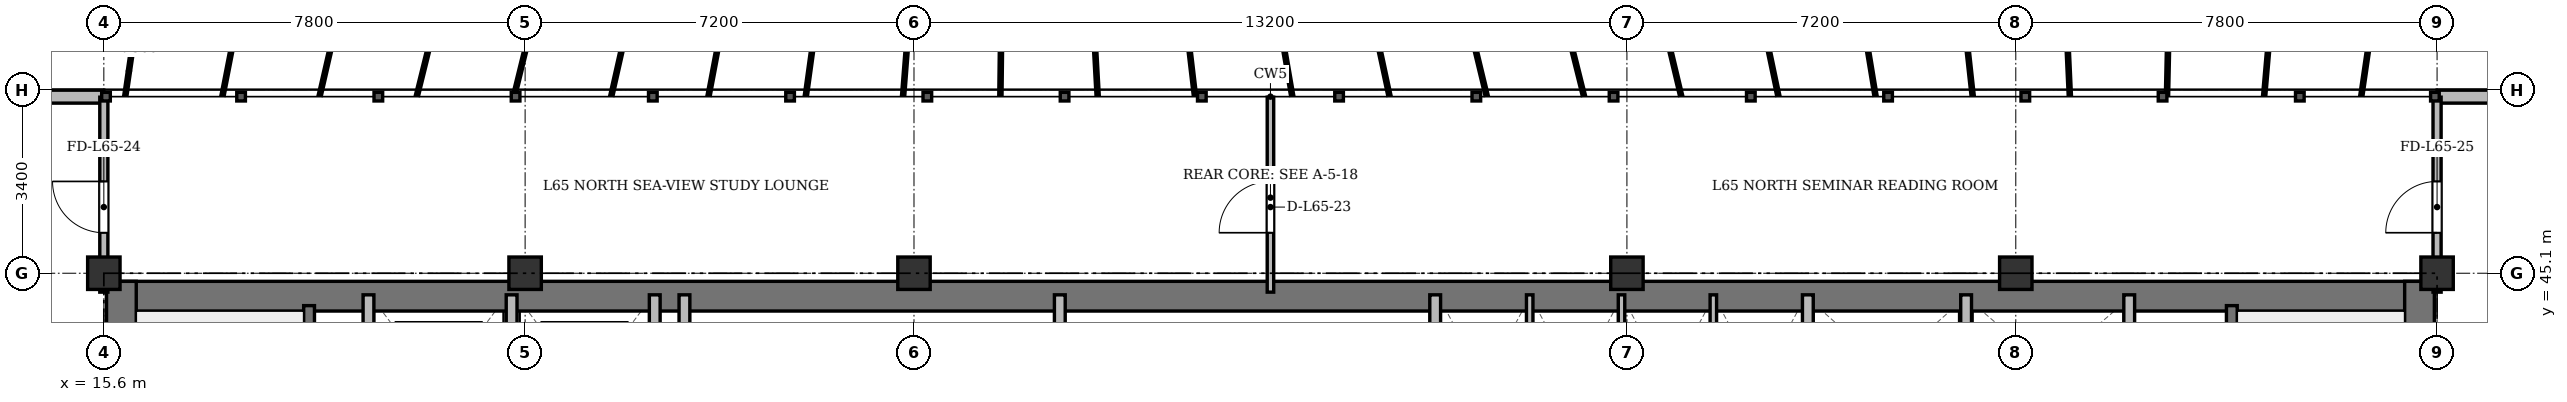
"""IFC4 building model, lengths in metres.
Left out: names, types, materials, properties, quantities, classifications, styles, units other than length and angle.
Written with IfcOpenShell. Run it as: python <this file> out.ifc"""

import sys

from ifc_helpers import new_model, si_unit, direction, frame, frame_2d, origin, origin_2d, place, context, subcontext, project, spatial, rectangle, extrude, source, transform, mapped, element, fill, save


model = new_model("IFC4")
c1 = context("Model", 3, precision=1e-05, world=origin(), true_north=direction((0.0, 1.0)))
c2 = subcontext(c1, "Body", "Model", "MODEL_VIEW")
j1 = project(units=[si_unit("LENGTHUNIT", "METRE"), si_unit("PLANEANGLEUNIT", "RADIAN")], contexts=[c1])
p1 = place(None, origin())
s1 = spatial("IfcSite", under=j1, at=p1, CompositionType="ELEMENT")
p2 = place(p1, origin())
s2 = spatial("IfcBuilding", under=s1, at=p2, CompositionType="ELEMENT")
p3 = place(p2, frame((0.0, 0.0, 252.3)))
s3 = spatial("IfcBuildingStorey", under=s2, at=p3, CompositionType="ELEMENT", Elevation=252.3)
m1 = source(origin(), c2, "Body", "SweptSolid", [
    extrude(rectangle(XDim=0.6, YDim=0.6, at=origin_2d()), origin(), (0.0, 0.0, 1.0), 3.6),
])
for number, where, z_axis, x_axis in (
    (1, (15.6, 45.1, 0.0), (0.0, 0.0, 1.0), (1.0, 0.0, 0.0)),
    (2, (23.4, 45.1, 0.0), (0.0, 0.0, 1.0), (1.0, 0.0, 0.0)),
    (3, (30.6, 45.1, 0.0), (0.0, 0.0, 1.0), (1.0, 0.0, 0.0)),
    (4, (43.8, 45.1, 0.0), (0.0, 0.0, 1.0), (1.0, 0.0, 0.0)),
    (5, (51.0, 45.1, 0.0), (0.0, 0.0, 1.0), (1.0, 0.0, 0.0)),
    (6, (58.8, 45.1, 0.0), (0.0, 0.0, 1.0), (1.0, 0.0, 0.0)),
):
    element("IfcColumn", number, at=place(p3, frame(where, z_axis=z_axis, x_axis=x_axis)), inside=s3, PredefinedType="COLUMN", context=c2, shape_type="MappedRepresentation", body=[
        mapped(m1, transform((0.0, 0.0, 0.0), x_axis=(1.0, 0.0, 0.0), y_axis=(0.0, 1.0, 0.0), z_axis=(0.0, 0.0, 1.0), scale=1.0)),
    ])
p4 = place(p3, frame((11.3, 48.37, 0.0), z_axis=(0.0, 0.0, 1.0), x_axis=(1.0, 0.0, 0.0)))
e7 = element("IfcWall", 7, at=p4, inside=s3, PredefinedType="SOLIDWALL", context=c2, shape_type="SweptSolid", body=[
    extrude(rectangle(XDim=4.3, YDim=0.24, at=frame_2d((2.15, 0.0))), origin(), (0.0, 0.0, 1.0), 3.37),
])
p5 = place(p4, frame((1.475, 0.0, 0.9)))
e8 = element("IfcOpeningElement", 8, at=p5, cuts=e7, PredefinedType="OPENING", context=c2, shape_type="SweptSolid", body=[
    extrude(rectangle(XDim=1.35, YDim=1.5, at=frame_2d((0.675, 0.75))), frame((0.0, 0.13, 0.0), z_axis=(0.0, -1.0, 0.0), x_axis=(1.0, 0.0, 0.0)), (0.0, 0.0, 1.0), 0.26),
])
p6 = place(p3, frame((58.8, 48.37, 0.0), z_axis=(0.0, 0.0, 1.0), x_axis=(1.0, 0.0, 0.0)))
e9 = element("IfcWall", 9, at=p6, inside=s3, PredefinedType="SOLIDWALL", context=c2, shape_type="SweptSolid", body=[
    extrude(rectangle(XDim=4.3, YDim=0.24, at=frame_2d((2.15, 0.0))), origin(), (0.0, 0.0, 1.0), 3.37),
])
p7 = place(p6, frame((1.475, 0.0, 0.9)))
e10 = element("IfcOpeningElement", 10, at=p7, cuts=e9, PredefinedType="OPENING", context=c2, shape_type="SweptSolid", body=[
    extrude(rectangle(XDim=1.35, YDim=1.5, at=frame_2d((0.675, 0.75))), frame((0.0, 0.13, 0.0), z_axis=(0.0, -1.0, 0.0), x_axis=(1.0, 0.0, 0.0)), (0.0, 0.0, 1.0), 0.26),
])
p8 = place(p3, frame((15.65, 44.675, 0.0), z_axis=(0.0, 0.0, 1.0), x_axis=(1.0, 0.0, 0.0)))
e11 = element("IfcWall", 11, at=p8, inside=s3, PredefinedType="SHEAR", context=c2, shape_type="SweptSolid", body=[
    extrude(rectangle(XDim=43.1, YDim=0.55, at=frame_2d((21.55, 0.0))), origin(), (0.0, 0.0, 1.0), 3.37),
])
for number, where, z_axis, x_axis in (
    (12, (15.925, 33.4, 0.0), (0.0, 0.0, 1.0), (0.0, 1.0, 0.0)),
    (13, (58.475, 33.4, 0.0), (0.0, 0.0, 1.0), (0.0, 1.0, 0.0)),
):
    element("IfcWall", number, at=place(p3, frame(where, z_axis=z_axis, x_axis=x_axis)), inside=s3, PredefinedType="SHEAR", context=c2, shape_type="SweptSolid", body=[
        extrude(rectangle(XDim=11.55, YDim=0.55, at=frame_2d((5.775, 0.0))), origin(), (0.0, 0.0, 1.0), 3.37),
    ])
p9 = place(p3, frame((19.4, 33.4, 0.0), z_axis=(0.0, 0.0, 1.0), x_axis=(0.0, 1.0, 0.0)))
e14 = element("IfcWall", 14, at=p9, inside=s3, PredefinedType="SHEAR", context=c2, shape_type="SweptSolid", body=[
    extrude(rectangle(XDim=11.1, YDim=0.2, at=frame_2d((5.55, 0.0))), origin(), (0.0, 0.0, 1.0), 3.37),
])
p10 = place(p9, frame((0.85, 0.0, 0.0)))
e15 = element("IfcOpeningElement", 15, at=p10, cuts=e14, PredefinedType="OPENING", context=c2, shape_type="SweptSolid", body=[
    extrude(rectangle(XDim=1.1, YDim=2.15, at=frame_2d((0.55, 1.075))), frame((0.0, 0.11, 0.0), z_axis=(0.0, -1.0, 0.0), x_axis=(1.0, 0.0, 0.0)), (0.0, 0.0, 1.0), 0.22),
])
p11 = place(p3, frame((55.0, 33.4, 0.0), z_axis=(0.0, 0.0, 1.0), x_axis=(0.0, 1.0, 0.0)))
e16 = element("IfcWall", 16, at=p11, inside=s3, PredefinedType="SHEAR", context=c2, shape_type="SweptSolid", body=[
    extrude(rectangle(XDim=11.1, YDim=0.2, at=frame_2d((5.55, 0.0))), origin(), (0.0, 0.0, 1.0), 3.37),
])
p12 = place(p11, frame((0.85, 0.0, 0.0)))
e17 = element("IfcOpeningElement", 17, at=p12, cuts=e16, PredefinedType="OPENING", context=c2, shape_type="SweptSolid", body=[
    extrude(rectangle(XDim=1.1, YDim=2.15, at=frame_2d((0.55, 1.075))), frame((0.0, 0.11, 0.0), z_axis=(0.0, -1.0, 0.0), x_axis=(1.0, 0.0, 0.0)), (0.0, 0.0, 1.0), 0.22),
])
for number, where, z_axis, x_axis in (
    (18, (20.5, 41.3, 0.0), (0.0, 0.0, 1.0), (0.0, 1.0, 0.0)),
    (19, (23.15, 41.3, 0.0), (0.0, 0.0, 1.0), (0.0, 1.0, 0.0)),
    (20, (25.8, 41.3, 0.0), (0.0, 0.0, 1.0), (0.0, 1.0, 0.0)),
):
    element("IfcWall", number, at=place(p3, frame(where, z_axis=z_axis, x_axis=x_axis)), inside=s3, PredefinedType="SOLIDWALL", context=c2, shape_type="SweptSolid", body=[
        extrude(rectangle(XDim=3.4, YDim=0.2, at=frame_2d((1.7, 0.0))), origin(), (0.0, 0.0, 1.0), 3.37),
    ])
for number, where, z_axis, x_axis in (
    (21, (26.35, 33.4, 0.0), (0.0, 0.0, 1.0), (0.0, 1.0, 0.0)),
    (22, (33.3, 33.4, 0.0), (0.0, 0.0, 1.0), (0.0, 1.0, 0.0)),
):
    element("IfcWall", number, at=place(p3, frame(where, z_axis=z_axis, x_axis=x_axis)), inside=s3, PredefinedType="SOLIDWALL", context=c2, shape_type="SweptSolid", body=[
        extrude(rectangle(XDim=11.3, YDim=0.2, at=frame_2d((5.65, 0.0))), origin(), (0.0, 0.0, 1.0), 2.92),
    ])
p13 = place(p3, frame((40.25, 41.5, 0.0), z_axis=(0.0, 0.0, 1.0), x_axis=(0.0, 1.0, 0.0)))
e23 = element("IfcWall", 23, at=p13, inside=s3, PredefinedType="SOLIDWALL", context=c2, shape_type="SweptSolid", body=[
    extrude(rectangle(XDim=3.2, YDim=0.2, at=frame_2d((1.6, 0.0))), origin(), (0.0, 0.0, 1.0), 3.37),
])
for number, where, z_axis, x_axis in (
    (24, (42.0, 41.5, 0.0), (0.0, 0.0, 1.0), (0.0, 1.0, 0.0)),
    (25, (43.7, 41.5, 0.0), (0.0, 0.0, 1.0), (0.0, 1.0, 0.0)),
    (26, (45.4, 41.5, 0.0), (0.0, 0.0, 1.0), (0.0, 1.0, 0.0)),
):
    element("IfcWall", number, at=place(p3, frame(where, z_axis=z_axis, x_axis=x_axis)), inside=s3, PredefinedType="PARTITIONING", context=c2, shape_type="SweptSolid", body=[
        extrude(rectangle(XDim=3.2, YDim=0.12, at=frame_2d((1.6, 0.0))), origin(), (0.0, 0.0, 1.0), 3.37),
    ])
p14 = place(p3, frame((47.15, 33.4, 0.0), z_axis=(0.0, 0.0, 1.0), x_axis=(0.0, 1.0, 0.0)))
e27 = element("IfcWall", 27, at=p14, inside=s3, PredefinedType="SOLIDWALL", context=c2, shape_type="SweptSolid", body=[
    extrude(rectangle(XDim=11.3, YDim=0.2, at=frame_2d((5.65, 0.0))), origin(), (0.0, 0.0, 1.0), 2.92),
])
for number, where, z_axis, x_axis in (
    (28, (50.08, 42.05, 0.0), (0.0, 0.0, 1.0), (0.0, 1.0, 0.0)),
    (29, (53.1, 42.05, 0.0), (0.0, 0.0, 1.0), (0.0, 1.0, 0.0)),
):
    element("IfcWall", number, at=place(p3, frame(where, z_axis=z_axis, x_axis=x_axis)), inside=s3, PredefinedType="SOLIDWALL", context=c2, shape_type="SweptSolid", body=[
        extrude(rectangle(XDim=2.65, YDim=0.2, at=frame_2d((1.325, 0.0))), origin(), (0.0, 0.0, 1.0), 3.37),
    ])
p15 = place(p3, frame((37.2, 44.75, 0.0), z_axis=(0.0, 0.0, 1.0), x_axis=(0.0, 1.0, 0.0)))
e30 = element("IfcWall", 30, at=p15, inside=s3, PredefinedType="PARTITIONING", context=c2, shape_type="SweptSolid", body=[
    extrude(rectangle(XDim=3.61, YDim=0.12, at=frame_2d((1.805, 0.0))), origin(), (0.0, 0.0, 1.0), 2.92),
])
p16 = place(p15, frame((1.1, 0.0, 0.0)))
e31 = element("IfcOpeningElement", 31, at=p16, cuts=e30, PredefinedType="OPENING", context=c2, shape_type="SweptSolid", body=[
    extrude(rectangle(XDim=0.95, YDim=2.15, at=frame_2d((0.475, 1.075))), frame((0.0, 0.07, 0.0), z_axis=(0.0, -1.0, 0.0), x_axis=(1.0, 0.0, 0.0)), (0.0, 0.0, 1.0), 0.14),
])
p17 = place(p3, frame((15.6, 44.75, 0.0), z_axis=(0.0, 0.0, 1.0), x_axis=(0.0, 1.0, 0.0)))
e32 = element("IfcWall", 32, at=p17, inside=s3, PredefinedType="PARTITIONING", context=c2, shape_type="SweptSolid", body=[
    extrude(rectangle(XDim=3.61, YDim=0.15, at=frame_2d((1.805, 0.0))), origin(), (0.0, 0.0, 1.0), 2.87),
])
p18 = place(p17, frame((1.1, 0.0, 0.0)))
e33 = element("IfcOpeningElement", 33, at=p18, cuts=e32, PredefinedType="OPENING", context=c2, shape_type="SweptSolid", body=[
    extrude(rectangle(XDim=0.95, YDim=2.15, at=frame_2d((0.475, 1.075))), frame((0.0, 0.085, 0.0), z_axis=(0.0, -1.0, 0.0), x_axis=(1.0, 0.0, 0.0)), (0.0, 0.0, 1.0), 0.17),
])
p19 = place(p3, frame((58.8, 44.75, 0.0), z_axis=(0.0, 0.0, 1.0), x_axis=(0.0, 1.0, 0.0)))
e34 = element("IfcWall", 34, at=p19, inside=s3, PredefinedType="PARTITIONING", context=c2, shape_type="SweptSolid", body=[
    extrude(rectangle(XDim=3.61, YDim=0.15, at=frame_2d((1.805, 0.0))), origin(), (0.0, 0.0, 1.0), 2.87),
])
p20 = place(p19, frame((1.1, 0.0, 0.0)))
e35 = element("IfcOpeningElement", 35, at=p20, cuts=e34, PredefinedType="OPENING", context=c2, shape_type="SweptSolid", body=[
    extrude(rectangle(XDim=0.95, YDim=2.15, at=frame_2d((0.475, 1.075))), frame((0.0, 0.085, 0.0), z_axis=(0.0, -1.0, 0.0), x_axis=(1.0, 0.0, 0.0)), (0.0, 0.0, 1.0), 0.17),
])
m2 = source(origin(), c2, "Body", "SweptSolid", [
    extrude(rectangle(XDim=0.95, YDim=2.15, at=frame_2d((0.475, 1.075))), frame((0.0, 0.025, 0.0), z_axis=(0.0, -1.0, 0.0), x_axis=(1.0, 0.0, 0.0)), (0.0, 0.0, 1.0), 0.05),
])
p21 = place(p16, origin())
e36 = element("IfcDoor", 36, at=p21, inside=s3, OperationType="SINGLE_SWING_LEFT", PredefinedType="DOOR", context=c2, shape_type="MappedRepresentation", body=[
    mapped(m2, transform((0.0, 0.0, 0.0), x_axis=(1.0, 0.0, 0.0), y_axis=(0.0, 1.0, 0.0), z_axis=(0.0, 0.0, 1.0), scale=1.0)),
])
fill(e31, e36)
p22 = place(p18, origin())
e37 = element("IfcDoor", 37, at=p22, inside=s3, OperationType="SINGLE_SWING_RIGHT", PredefinedType="DOOR", context=c2, shape_type="MappedRepresentation", body=[
    mapped(m2, transform((0.0, 0.0, 0.0), x_axis=(1.0, 0.0, 0.0), y_axis=(0.0, 1.0, 0.0), z_axis=(0.0, 0.0, 1.0), scale=1.0)),
])
fill(e33, e37)
p23 = place(p20, origin())
e38 = element("IfcDoor", 38, at=p23, inside=s3, OperationType="SINGLE_SWING_LEFT", PredefinedType="DOOR", context=c2, shape_type="MappedRepresentation", body=[
    mapped(m2, transform((0.0, 0.0, 0.0), x_axis=(1.0, 0.0, 0.0), y_axis=(0.0, 1.0, 0.0), z_axis=(0.0, 0.0, 1.0), scale=1.0)),
])
fill(e35, e38)
save(model, sys.argv[1])
